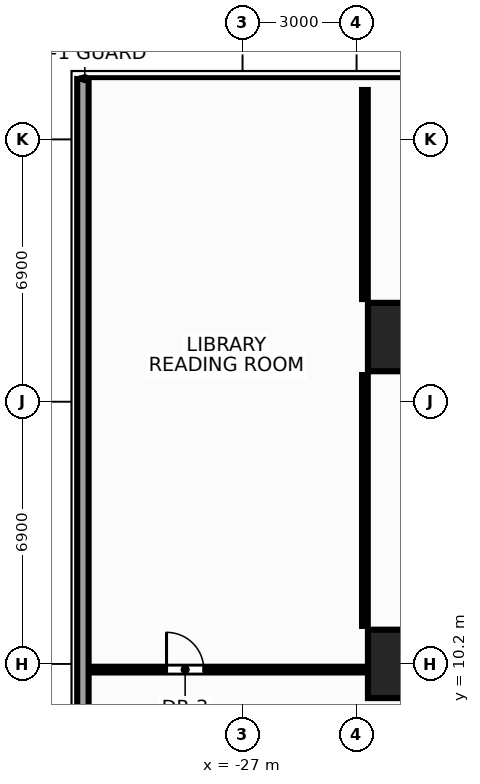
"""IFC4 building model, lengths in metres.
Left out: names, types, materials, properties, quantities, classifications, styles, units other than length and angle.
Written with IfcOpenShell. Run it as: python <this file> out.ifc"""

import sys

from ifc_helpers import new_model, si_unit, direction, frame, frame_2d, origin, origin_2d, place, context, subcontext, project, spatial, rectangle, extrude, source, transform, mapped, element, fill, save


model = new_model("IFC4")
c1 = context("Model", 3, precision=1e-05, world=origin(), true_north=direction((0.0, 1.0)))
c2 = subcontext(c1, "Body", "Model", "MODEL_VIEW")
j1 = project(units=[si_unit("LENGTHUNIT", "METRE"), si_unit("PLANEANGLEUNIT", "RADIAN")], contexts=[c1])
p1 = place(None, origin())
s1 = spatial("IfcSite", under=j1, at=p1, CompositionType="ELEMENT")
p2 = place(p1, origin())
s2 = spatial("IfcBuilding", under=s1, at=p2, CompositionType="ELEMENT")
p3 = place(p2, frame((0.0, 0.0, 14.3)))
s3 = spatial("IfcBuildingStorey", under=s2, at=p3, CompositionType="ELEMENT", Elevation=14.3)
m1 = source(origin(), c2, "Body", "SweptSolid", [
    extrude(rectangle(XDim=1.8, YDim=1.8, at=origin_2d()), origin(), (0.0, 0.0, 1.0), 4.65),
])
for number, where, z_axis, x_axis in (
    (1, (-22.8, 10.2, 0.0), (0.0, 0.0, 1.0), (1.0, 0.0, 0.0)),
    (2, (-22.8, 18.8, 0.0), (0.0, 0.0, 1.0), (1.0, 0.0, 0.0)),
):
    element("IfcColumn", number, at=place(p3, frame(where, z_axis=z_axis, x_axis=x_axis)), inside=s3, PredefinedType="COLUMN", context=c2, shape_type="MappedRepresentation", body=[
        mapped(m1, transform((0.0, 0.0, 0.0), x_axis=(1.0, 0.0, 0.0), y_axis=(0.0, 1.0, 0.0), z_axis=(0.0, 0.0, 1.0), scale=1.0)),
    ])
m2 = source(origin(), c2, "Body", "SweptSolid", [
    extrude(rectangle(XDim=52.79, YDim=0.3, at=frame_2d((26.395, 0.0))), origin(), (0.0, 0.0, 1.0), 3.83),
])
p4 = place(p3, frame((-31.2, -27.2, 0.0), z_axis=(0.0, 0.0, 1.0), x_axis=(0.0, 1.0, 0.0)))
e3 = element("IfcWall", 3, at=p4, inside=s3, PredefinedType="STANDARD", context=c2, shape_type="MappedRepresentation", body=[
    mapped(m2, transform((0.0, 0.0, 0.0), x_axis=(1.0, 0.0, 0.0), y_axis=(0.0, 1.0, 0.0), z_axis=(0.0, 0.0, 1.0), scale=1.0)),
])
m3 = source(origin(), c2, "Body", "SweptSolid", [
    extrude(rectangle(XDim=7.2, YDim=0.15, at=frame_2d((3.6, 0.0))), origin(), (0.0, 0.0, 1.0), 4.33),
])
p5 = place(p3, frame((-31.0, 10.05, 0.0), z_axis=(0.0, 0.0, 1.0), x_axis=(1.0, 0.0, 0.0)))
e4 = element("IfcWall", 4, at=p5, inside=s3, PredefinedType="PARTITIONING", context=c2, shape_type="MappedRepresentation", body=[
    mapped(m3, transform((0.0, 0.0, 0.0), x_axis=(1.0, 0.0, 0.0), y_axis=(0.0, 1.0, 0.0), z_axis=(0.0, 0.0, 1.0), scale=1.0)),
])
p6 = place(p5, frame((2.0, 0.0, 0.0)))
e5 = element("IfcOpeningElement", 5, at=p6, cuts=e4, PredefinedType="OPENING", context=c2, shape_type="SweptSolid", body=[
    extrude(rectangle(XDim=0.98, YDim=2.15, at=frame_2d((0.49, 1.075))), frame((0.0, 0.087, 0.0), z_axis=(0.0, -1.0, 0.0), x_axis=(1.0, 0.0, 0.0)), (0.0, 0.0, 1.0), 0.174),
])
m4 = source(origin(), c2, "Body", "SweptSolid", [
    extrude(rectangle(XDim=6.6, YDim=0.15, at=frame_2d((3.3, 0.0))), origin(), (0.0, 0.0, 1.0), 4.33),
])
p7 = place(p3, frame((-23.78, 11.2, 0.0), z_axis=(0.0, 0.0, 1.0), x_axis=(0.0, 1.0, 0.0)))
e6 = element("IfcWall", 6, at=p7, inside=s3, PredefinedType="PARTITIONING", context=c2, shape_type="MappedRepresentation", body=[
    mapped(m4, transform((0.0, 0.0, 0.0), x_axis=(1.0, 0.0, 0.0), y_axis=(0.0, 1.0, 0.0), z_axis=(0.0, 0.0, 1.0), scale=1.0)),
])
m5 = source(origin(), c2, "Body", "SweptSolid", [
    extrude(rectangle(XDim=5.5, YDim=0.15, at=frame_2d((2.75, 0.0))), origin(), (0.0, 0.0, 1.0), 4.33),
])
p8 = place(p3, frame((-23.78, 19.8, 0.0), z_axis=(0.0, 0.0, 1.0), x_axis=(0.0, 1.0, 0.0)))
e7 = element("IfcWall", 7, at=p8, inside=s3, PredefinedType="PARTITIONING", context=c2, shape_type="MappedRepresentation", body=[
    mapped(m5, transform((0.0, 0.0, 0.0), x_axis=(1.0, 0.0, 0.0), y_axis=(0.0, 1.0, 0.0), z_axis=(0.0, 0.0, 1.0), scale=1.0)),
])
m6 = source(origin(), c2, "Body", "SweptSolid", [
    extrude(rectangle(XDim=0.98, YDim=2.15, at=frame_2d((0.49, 1.075))), frame((0.0, 0.025, 0.0), z_axis=(0.0, -1.0, 0.0), x_axis=(1.0, 0.0, 0.0)), (0.0, 0.0, 1.0), 0.05),
])
p9 = place(p6, origin())
e8 = element("IfcDoor", 8, at=p9, inside=s3, OperationType="SINGLE_SWING_LEFT", PredefinedType="DOOR", context=c2, shape_type="MappedRepresentation", body=[
    mapped(m6, transform((0.0, 0.0, 0.0), x_axis=(1.0, 0.0, 0.0), y_axis=(0.0, 1.0, 0.0), z_axis=(0.0, 0.0, 1.0), scale=1.0)),
])
fill(e5, e8)
save(model, sys.argv[1])
